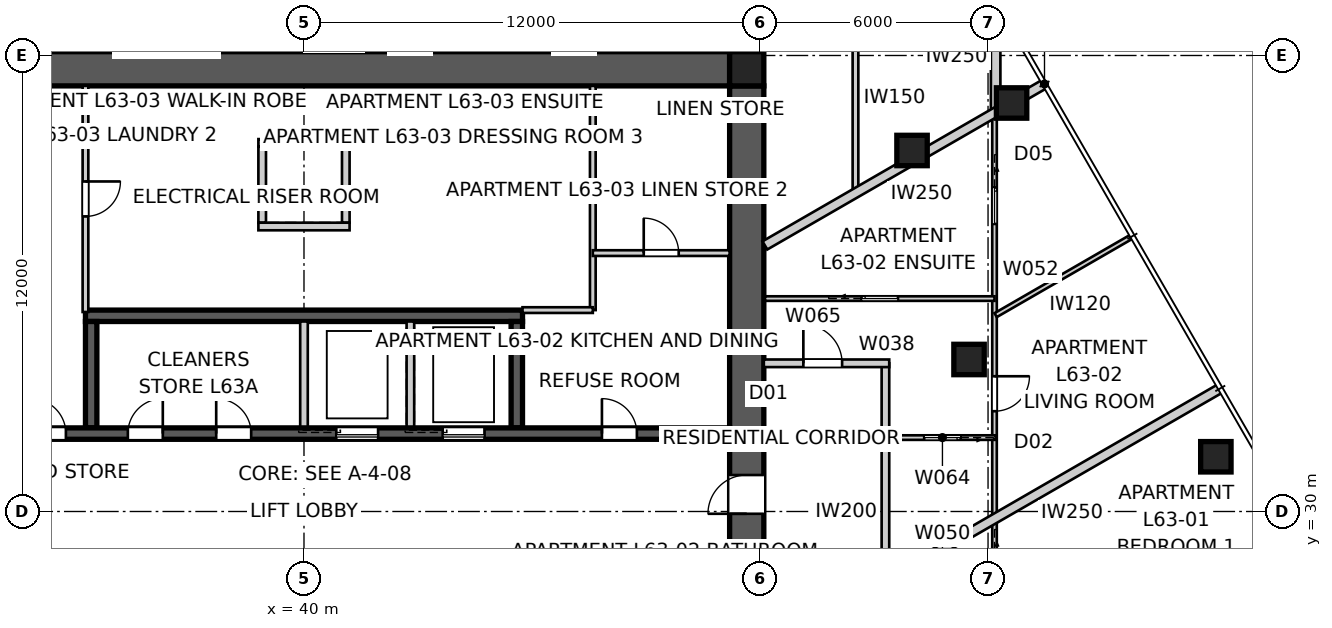
"""IFC4 building model, lengths in metres.
Left out: names, types, materials, properties, quantities, classifications, styles, units other than length and angle.
Written with IfcOpenShell. Run it as: python <this file> out.ifc"""

import sys

from ifc_helpers import new_model, si_unit, direction, frame, frame_2d, origin, origin_2d, place, context, subcontext, project, spatial, polyline, rectangle, outline, extrude, element, fill, save


model = new_model("IFC4")
c1 = context("Model", 3, precision=1e-05, world=origin(), true_north=direction((0.0, 1.0)))
c2 = subcontext(c1, "Body", "Model", "MODEL_VIEW")
j1 = project(units=[si_unit("LENGTHUNIT", "METRE"), si_unit("PLANEANGLEUNIT", "RADIAN")], contexts=[c1])
p1 = place(None, origin())
s1 = spatial("IfcSite", under=j1, at=p1, CompositionType="ELEMENT")
p2 = place(p1, origin())
s2 = spatial("IfcBuilding", under=s1, at=p2, CompositionType="ELEMENT")
p3 = place(p2, frame((0.0, 0.0, 228.6)))
s3 = spatial("IfcBuildingStorey", under=s2, at=p3, CompositionType="ELEMENT", Elevation=228.6)
p4 = place(p3, frame((28.8, 41.65, 0.0), z_axis=(0.0, 0.0, 1.0), x_axis=(1.0, 0.0, 0.0)))
e1 = element("IfcWall", 1, at=p4, inside=s3, PredefinedType="SHEAR", context=c2, shape_type="SweptSolid", body=[
    extrude(outline(polyline([(0.0, -0.45), (22.4, -0.45), (22.4, -0.025), (22.85, -0.025), (22.85, 0.025), (22.4, 0.025), (22.4, 0.45), (0.0, 0.45), (0.0, 0.025), (-0.45, 0.025), (-0.45, -0.025), (0.0, -0.025), (0.0, -0.45)])), origin(), (0.0, 0.0, 1.0), 3.4),
])
p5 = place(p3, frame((51.65, 18.8, 0.0), z_axis=(0.0, 0.0, 1.0), x_axis=(0.0, 1.0, 0.0)))
e2 = element("IfcWall", 2, at=p5, inside=s3, PredefinedType="SHEAR", context=c2, shape_type="SweptSolid", body=[
    extrude(outline(polyline([(0.0, -0.45), (22.4, -0.45), (22.4, -0.025), (22.85, -0.025), (22.85, 0.025), (22.4, 0.025), (22.4, 0.45), (0.0, 0.45), (0.0, 0.025), (-0.45, 0.025), (-0.45, -0.025), (0.0, -0.025), (0.0, -0.45)])), origin(), (0.0, 0.0, 1.0), 3.4),
])
p6 = place(p5, frame((11.14, 0.0, 0.0)))
e3 = element("IfcOpeningElement", 3, at=p6, cuts=e2, PredefinedType="OPENING", context=c2, shape_type="SweptSolid", body=[
    extrude(rectangle(XDim=1.02, YDim=2.4, at=frame_2d((0.51, 1.2))), frame((0.0, 0.46, 0.0), z_axis=(0.0, -1.0, 0.0), x_axis=(1.0, 0.0, 0.0)), (0.0, 0.0, 1.0), 0.92),
])
p7 = place(p3, frame((28.8, 32.05, 0.0), z_axis=(0.0, 0.0, 1.0), x_axis=(1.0, 0.0, 0.0)))
e4 = element("IfcWall", 4, at=p7, inside=s3, PredefinedType="SHEAR", context=c2, shape_type="SweptSolid", body=[
    extrude(rectangle(XDim=22.4, YDim=0.3, at=frame_2d((11.2, 0.0))), origin(), (0.0, 0.0, 1.0), 3.4),
])
p8 = place(p7, frame((19.04, 0.0, 0.0)))
e5 = element("IfcOpeningElement", 5, at=p8, cuts=e4, PredefinedType="OPENING", context=c2, shape_type="SweptSolid", body=[
    extrude(rectangle(XDim=0.92, YDim=2.1, at=frame_2d((0.46, 1.05))), frame((0.0, 0.16, 0.0), z_axis=(0.0, -1.0, 0.0), x_axis=(1.0, 0.0, 0.0)), (0.0, 0.0, 1.0), 0.32),
])
p9 = place(p7, frame((1.265, 0.0, 0.0)))
e6 = element("IfcOpeningElement", 6, at=p9, cuts=e4, PredefinedType="OPENING", context=c2, shape_type="SweptSolid", body=[
    extrude(rectangle(XDim=1.02, YDim=2.1, at=frame_2d((0.51, 1.05))), frame((0.0, 0.16, 0.0), z_axis=(0.0, -1.0, 0.0), x_axis=(1.0, 0.0, 0.0)), (0.0, 0.0, 1.0), 0.32),
])
p10 = place(p7, frame((4.015, 0.0, 0.0)))
e7 = element("IfcOpeningElement", 7, at=p10, cuts=e4, PredefinedType="OPENING", context=c2, shape_type="SweptSolid", body=[
    extrude(rectangle(XDim=0.92, YDim=2.1, at=frame_2d((0.46, 1.05))), frame((0.0, 0.16, 0.0), z_axis=(0.0, -1.0, 0.0), x_axis=(1.0, 0.0, 0.0)), (0.0, 0.0, 1.0), 0.32),
])
p11 = place(p7, frame((6.565, 0.0, 0.0)))
e8 = element("IfcOpeningElement", 8, at=p11, cuts=e4, PredefinedType="OPENING", context=c2, shape_type="SweptSolid", body=[
    extrude(rectangle(XDim=0.92, YDim=2.1, at=frame_2d((0.46, 1.05))), frame((0.0, 0.16, 0.0), z_axis=(0.0, -1.0, 0.0), x_axis=(1.0, 0.0, 0.0)), (0.0, 0.0, 1.0), 0.32),
])
p12 = place(p7, frame((8.89, 0.0, 0.0)))
e9 = element("IfcOpeningElement", 9, at=p12, cuts=e4, PredefinedType="OPENING", context=c2, shape_type="SweptSolid", body=[
    extrude(rectangle(XDim=0.92, YDim=2.1, at=frame_2d((0.46, 1.05))), frame((0.0, 0.16, 0.0), z_axis=(0.0, -1.0, 0.0), x_axis=(1.0, 0.0, 0.0)), (0.0, 0.0, 1.0), 0.32),
])
p13 = place(p7, frame((12.05, 0.0, 0.0)))
e10 = element("IfcOpeningElement", 10, at=p13, cuts=e4, PredefinedType="OPENING", context=c2, shape_type="SweptSolid", body=[
    extrude(rectangle(XDim=1.1, YDim=2.1, at=frame_2d((0.55, 1.05))), frame((0.0, 0.16, 0.0), z_axis=(0.0, -1.0, 0.0), x_axis=(1.0, 0.0, 0.0)), (0.0, 0.0, 1.0), 0.32),
])
p14 = place(p7, frame((14.85, 0.0, 0.0)))
e11 = element("IfcOpeningElement", 11, at=p14, cuts=e4, PredefinedType="OPENING", context=c2, shape_type="SweptSolid", body=[
    extrude(rectangle(XDim=1.1, YDim=2.1, at=frame_2d((0.55, 1.05))), frame((0.0, 0.16, 0.0), z_axis=(0.0, -1.0, 0.0), x_axis=(1.0, 0.0, 0.0)), (0.0, 0.0, 1.0), 0.32),
])
p15 = place(p3, frame((34.25, 35.15, 0.0), z_axis=(0.0, 0.0, 1.0), x_axis=(1.0, 0.0, 0.0)))
e12 = element("IfcWall", 12, at=p15, inside=s3, PredefinedType="SHEAR", context=c2, shape_type="SweptSolid", body=[
    extrude(rectangle(XDim=11.5, YDim=0.3, at=frame_2d((5.75, 0.0))), origin(), (0.0, 0.0, 1.0), 3.4),
])
p16 = place(p3, frame((34.4, 32.2, 0.0), z_axis=(0.0, 0.0, 1.0), x_axis=(0.0, 1.0, 0.0)))
e13 = element("IfcWall", 13, at=p16, inside=s3, PredefinedType="SHEAR", context=c2, shape_type="SweptSolid", body=[
    extrude(rectangle(XDim=2.8, YDim=0.3, at=frame_2d((1.4, 0.0))), origin(), (0.0, 0.0, 1.0), 3.4),
])
for number, where, z_axis, x_axis in (
    (14, (40.0, 32.2, 0.0), (0.0, 0.0, 1.0), (0.0, 1.0, 0.0)),
    (15, (42.8, 32.2, 0.0), (0.0, 0.0, 1.0), (0.0, 1.0, 0.0)),
):
    element("IfcWall", number, at=place(p3, frame(where, z_axis=z_axis, x_axis=x_axis)), inside=s3, PredefinedType="SOLIDWALL", context=c2, shape_type="SweptSolid", body=[
        extrude(rectangle(XDim=2.8, YDim=0.2, at=frame_2d((1.4, 0.0))), origin(), (0.0, 0.0, 1.0), 3.4),
    ])
p17 = place(p3, frame((45.6, 32.2, 0.0), z_axis=(0.0, 0.0, 1.0), x_axis=(0.0, 1.0, 0.0)))
e16 = element("IfcWall", 16, at=p17, inside=s3, PredefinedType="SHEAR", context=c2, shape_type="SweptSolid", body=[
    extrude(rectangle(XDim=2.8, YDim=0.3, at=frame_2d((1.4, 0.0))), origin(), (0.0, 0.0, 1.0), 3.4),
])
for number, where, z_axis, x_axis in (
    (17, (38.9, 37.6, 0.0), (0.0, 0.0, 1.0), (0.0, 1.0, 0.0)),
    (18, (41.1, 37.6, 0.0), (0.0, 0.0, 1.0), (0.0, 1.0, 0.0)),
):
    element("IfcWall", number, at=place(p3, frame(where, z_axis=z_axis, x_axis=x_axis)), inside=s3, PredefinedType="SOLIDWALL", context=c2, shape_type="SweptSolid", body=[
        extrude(rectangle(XDim=2.0, YDim=0.2, at=frame_2d((1.0, 0.0))), origin(), (0.0, 0.0, 1.0), 3.4),
    ])
for number, where, z_axis, x_axis in (
    (19, (38.8, 37.5, 0.0), (0.0, 0.0, 1.0), (1.0, 0.0, 0.0)),
    (20, (38.8, 39.7, 0.0), (0.0, 0.0, 1.0), (1.0, 0.0, 0.0)),
):
    element("IfcWall", number, at=place(p3, frame(where, z_axis=z_axis, x_axis=x_axis)), inside=s3, PredefinedType="SOLIDWALL", context=c2, shape_type="SweptSolid", body=[
        extrude(rectangle(XDim=2.4, YDim=0.2, at=frame_2d((1.2, 0.0))), origin(), (0.0, 0.0, 1.0), 3.4),
    ])
p18 = place(p3, frame((51.65, 41.65, 0.0), z_axis=(0.0, 0.0, 1.0), x_axis=(1.0, 0.0, 0.0)))
e21 = element("IfcColumn", 21, at=p18, inside=s3, PredefinedType="COLUMN", context=c2, shape_type="SweptSolid", body=[
    extrude(rectangle(XDim=0.9, YDim=0.9, at=origin_2d()), origin(), (0.0, 0.0, 1.0), 3.4),
])
for number, where, z_axis, x_axis in (
    (22, (63.995, 31.44, 0.0), (0.0, 0.0, 1.0), (1.0, 0.0, 0.0)),
    (23, (58.62, 40.75, 0.0), (0.0, 0.0, 1.0), (1.0, 0.0, 0.0)),
    (24, (57.5, 34.0, 0.0), (0.0, 0.0, 1.0), (1.0, 0.0, 0.0)),
    (25, (56.0, 39.5, 0.0), (0.0, 0.0, 1.0), (1.0, 0.0, 0.0)),
):
    element("IfcColumn", number, at=place(p3, frame(where, z_axis=z_axis, x_axis=x_axis)), inside=s3, PredefinedType="COLUMN", context=c2, shape_type="SweptSolid", body=[
        extrude(rectangle(XDim=0.8, YDim=0.8, at=origin_2d()), origin(), (0.0, 0.0, 1.0), 3.4),
    ])
p19 = place(p3, frame((55.3, 26.1, 0.0), z_axis=(0.0, 0.0, 1.0), x_axis=(0.0, 1.0, 0.0)))
e26 = element("IfcWall", 26, at=p19, inside=s3, PredefinedType="PARTITIONING", context=c2, shape_type="SweptSolid", body=[
    extrude(rectangle(XDim=7.8, YDim=0.2, at=frame_2d((3.9, 0.0))), origin(), (0.0, 0.0, 1.0), 3.25),
])
p20 = place(p3, frame((52.1, 33.9, 0.0), z_axis=(0.0, 0.0, 1.0), x_axis=(1.0, 0.0, 0.0)))
e27 = element("IfcWall", 27, at=p20, inside=s3, PredefinedType="PARTITIONING", context=c2, shape_type="SweptSolid", body=[
    extrude(rectangle(XDim=3.3, YDim=0.2, at=frame_2d((1.65, 0.0))), origin(), (0.0, 0.0, 1.0), 3.25),
])
p21 = place(p20, frame((1.04, 0.0, 0.0)))
e28 = element("IfcOpeningElement", 28, at=p21, cuts=e27, PredefinedType="OPENING", context=c2, shape_type="SweptSolid", body=[
    extrude(rectangle(XDim=1.02, YDim=2.34, at=frame_2d((0.51, 1.17))), frame((0.0, 0.11, 0.0), z_axis=(0.0, -1.0, 0.0), x_axis=(1.0, 0.0, 0.0)), (0.0, 0.0, 1.0), 0.22),
])
p22 = place(p3, frame((64.111, 33.239, 0.0), z_axis=(0.0, 0.0, 1.0), x_axis=(-0.866024190901, -0.50000210077, 0.0)))
e29 = element("IfcWall", 29, at=p22, inside=s3, PredefinedType="PARTITIONING", context=c2, shape_type="SweptSolid", body=[
    extrude(rectangle(XDim=10.026, YDim=0.25, at=frame_2d((5.013, 0.0))), origin(), (0.0, 0.0, 1.0), 3.25),
])
p23 = place(p3, frame((59.486, 41.25, 0.0), z_axis=(0.0, 0.0, 1.0), x_axis=(-0.866020489494, -0.500008511703, 0.0)))
e30 = element("IfcWall", 30, at=p23, inside=s3, PredefinedType="PARTITIONING", context=c2, shape_type="SweptSolid", body=[
    extrude(rectangle(XDim=8.496, YDim=0.25, at=frame_2d((4.248, 0.0))), origin(), (0.0, 0.0, 1.0), 3.25),
])
p24 = place(p3, frame((34.25, 41.2, 0.0), z_axis=(0.0, 0.0, 1.0), x_axis=(0.0, -1.0, 0.0)))
e31 = element("IfcWall", 31, at=p24, inside=s3, PredefinedType="SOLIDWALL", context=c2, shape_type="SweptSolid", body=[
    extrude(rectangle(XDim=5.95, YDim=0.15, at=frame_2d((2.975, 0.0))), origin(), (0.0, 0.0, 1.0), 3.25),
])
p25 = place(p24, frame((2.515, 0.0, 0.0)))
e32 = element("IfcOpeningElement", 32, at=p25, cuts=e31, PredefinedType="OPENING", context=c2, shape_type="SweptSolid", body=[
    extrude(rectangle(XDim=0.92, YDim=2.1, at=frame_2d((0.46, 1.05))), frame((0.0, 0.085, 0.0), z_axis=(0.0, -1.0, 0.0), x_axis=(1.0, 0.0, 0.0)), (0.0, 0.0, 1.0), 0.17),
])
p26 = place(p3, frame((47.6, 41.2, 0.0), z_axis=(0.0, 0.0, 1.0), x_axis=(0.0, -1.0, 0.0)))
e33 = element("IfcWall", 33, at=p26, inside=s3, PredefinedType="SOLIDWALL", context=c2, shape_type="SweptSolid", body=[
    extrude(rectangle(XDim=5.9, YDim=0.15, at=frame_2d((2.95, 0.0))), origin(), (0.0, 0.0, 1.0), 3.25),
])
p27 = place(p3, frame((47.6, 35.3, 0.0), z_axis=(0.0, 0.0, 1.0), x_axis=(-1.0, 0.0, 0.0)))
e34 = element("IfcWall", 34, at=p27, inside=s3, PredefinedType="SOLIDWALL", context=c2, shape_type="SweptSolid", body=[
    extrude(rectangle(XDim=1.85, YDim=0.15, at=frame_2d((0.925, 0.0))), origin(), (0.0, 0.0, 1.0), 3.25),
])
p28 = place(p3, frame((47.6, 36.8, 0.0), z_axis=(0.0, 0.0, 1.0), x_axis=(1.0, 0.0, 0.0)))
e35 = element("IfcWall", 35, at=p28, inside=s3, PredefinedType="SOLIDWALL", context=c2, shape_type="SweptSolid", body=[
    extrude(rectangle(XDim=3.6, YDim=0.15, at=frame_2d((1.8, 0.0))), origin(), (0.0, 0.0, 1.0), 3.25),
])
p29 = place(p28, frame((1.34, 0.0, 0.0)))
e36 = element("IfcOpeningElement", 36, at=p29, cuts=e35, PredefinedType="OPENING", context=c2, shape_type="SweptSolid", body=[
    extrude(rectangle(XDim=0.92, YDim=2.1, at=frame_2d((0.46, 1.05))), frame((0.0, 0.085, 0.0), z_axis=(0.0, -1.0, 0.0), x_axis=(1.0, 0.0, 0.0)), (0.0, 0.0, 1.0), 0.17),
])
p30 = place(p3, frame((58.171, 40.491, 0.0), z_axis=(0.0, 0.0, 1.0), x_axis=(-5.1455328e-05, -0.999999998676, 0.0)))
e37 = element("IfcWall", 37, at=p30, inside=s3, PredefinedType="PARTITIONING", context=c2, shape_type="SweptSolid", body=[
    extrude(rectangle(XDim=14.234, YDim=0.12, at=frame_2d((7.117, 0.0))), origin(), (0.0, 0.0, 1.0), 3.25),
])
p31 = place(p30, frame((6.932, 0.0, 0.0)))
e38 = element("IfcOpeningElement", 38, at=p31, cuts=e37, PredefinedType="OPENING", context=c2, shape_type="SweptSolid", body=[
    extrude(rectangle(XDim=0.92, YDim=2.34, at=frame_2d((0.46, 1.17))), frame((0.0, 0.07, 0.0), z_axis=(0.0, -1.0, 0.0), x_axis=(1.0, 0.0, 0.0)), (0.0, 0.0, 1.0), 0.14),
])
p32 = place(p30, frame((11.829, 0.0, 0.0)))
e39 = element("IfcOpeningElement", 39, at=p32, cuts=e37, PredefinedType="OPENING", context=c2, shape_type="SweptSolid", body=[
    extrude(rectangle(XDim=0.96, YDim=2.1, at=frame_2d((0.48, 1.05))), frame((0.0, 0.07, 0.0), z_axis=(0.0, -1.0, 0.0), x_axis=(1.0, 0.0, 0.0)), (0.0, 0.0, 1.0), 0.14),
])
p33 = place(p30, frame((1.964, 0.0, 0.0)))
e40 = element("IfcOpeningElement", 40, at=p33, cuts=e37, PredefinedType="OPENING", context=c2, shape_type="SweptSolid", body=[
    extrude(rectangle(XDim=0.96, YDim=2.1, at=frame_2d((0.48, 1.05))), frame((0.0, 0.07, 0.0), z_axis=(0.0, -1.0, 0.0), x_axis=(1.0, 0.0, 0.0)), (0.0, 0.0, 1.0), 0.14),
])
p34 = place(p3, frame((66.388, 29.214, 0.0), z_axis=(0.0, 0.0, 1.0), x_axis=(-0.86602907136, -0.49999364752, 0.0)))
e41 = element("IfcWall", 41, at=p34, inside=s3, PredefinedType="PARTITIONING", context=c2, shape_type="SweptSolid", body=[
    extrude(rectangle(XDim=9.455, YDim=0.12, at=frame_2d((4.728, 0.0))), origin(), (0.0, 0.0, 1.0), 3.25),
])
p35 = place(p3, frame((58.2, 31.945, 0.0), z_axis=(0.0, 0.0, 1.0), x_axis=(-1.0, 0.0, 0.0)))
e42 = element("IfcWall", 42, at=p35, inside=s3, PredefinedType="PARTITIONING", context=c2, shape_type="SweptSolid", body=[
    extrude(rectangle(XDim=2.8, YDim=0.12, at=frame_2d((1.4, 0.0))), origin(), (0.0, 0.0, 1.0), 3.25),
])
p36 = place(p35, frame((0.92, 0.0, 0.0)))
e43 = element("IfcOpeningElement", 43, at=p36, cuts=e42, PredefinedType="OPENING", context=c2, shape_type="SweptSolid", body=[
    extrude(rectangle(XDim=0.96, YDim=2.1, at=frame_2d((0.48, 1.05))), frame((0.0, 0.07, 0.0), z_axis=(0.0, -1.0, 0.0), x_axis=(1.0, 0.0, 0.0)), (0.0, 0.0, 1.0), 0.14),
])
p37 = place(p3, frame((52.13, 35.603, 0.0), z_axis=(0.0, 0.0, 1.0), x_axis=(1.0, 0.0, 0.0)))
e44 = element("IfcWall", 44, at=p37, inside=s3, PredefinedType="PARTITIONING", context=c2, shape_type="SweptSolid", body=[
    extrude(rectangle(XDim=6.04, YDim=0.12, at=frame_2d((3.02, 0.0))), origin(), (0.0, 0.0, 1.0), 3.25),
])
p38 = place(p37, frame((2.54, 0.0, 0.0)))
e45 = element("IfcOpeningElement", 45, at=p38, cuts=e44, PredefinedType="OPENING", context=c2, shape_type="SweptSolid", body=[
    extrude(rectangle(XDim=0.96, YDim=2.1, at=frame_2d((0.48, 1.05))), frame((0.0, 0.07, 0.0), z_axis=(0.0, -1.0, 0.0), x_axis=(1.0, 0.0, 0.0)), (0.0, 0.0, 1.0), 0.14),
])
p39 = place(p3, frame((58.2, 35.167, 0.0), z_axis=(0.0, 0.0, 1.0), x_axis=(0.866025520146, 0.499999798456, 0.0)))
e46 = element("IfcWall", 46, at=p39, inside=s3, PredefinedType="PARTITIONING", context=c2, shape_type="SweptSolid", body=[
    extrude(rectangle(XDim=4.115, YDim=0.12, at=frame_2d((2.057, 0.0))), origin(), (0.0, 0.0, 1.0), 3.25),
])
p40 = place(p3, frame((58.2, 40.525, 0.0), z_axis=(0.0, 0.0, 1.0), x_axis=(0.0, 1.0, 0.0)))
e47 = element("IfcWall", 47, at=p40, inside=s3, PredefinedType="PARTITIONING", context=c2, shape_type="SweptSolid", body=[
    extrude(rectangle(XDim=2.872, YDim=0.25, at=frame_2d((1.436, 0.0))), origin(), (0.0, 0.0, 1.0), 3.25),
])
p41 = place(p3, frame((54.512, 43.376, 0.0), z_axis=(0.0, 0.0, 1.0), x_axis=(0.0, -1.0, 0.0)))
e48 = element("IfcWall", 48, at=p41, inside=s3, PredefinedType="SOLIDWALL", context=c2, shape_type="SweptSolid", body=[
    extrude(rectangle(XDim=4.998, YDim=0.15, at=frame_2d((2.499, 0.0))), origin(), (0.0, 0.0, 1.0), 3.25),
])
p42 = place(p8, origin())
e49 = element("IfcDoor", 49, at=p42, inside=s3, OperationType="SINGLE_SWING_LEFT", PredefinedType="DOOR", context=c2, shape_type="SweptSolid", body=[
    extrude(rectangle(XDim=0.92, YDim=2.1, at=frame_2d((0.46, 1.05))), frame((0.0, 0.025, 0.0), z_axis=(0.0, -1.0, 0.0), x_axis=(1.0, 0.0, 0.0)), (0.0, 0.0, 1.0), 0.05),
])
fill(e5, e49)
p43 = place(p10, origin())
e50 = element("IfcDoor", 50, at=p43, inside=s3, OperationType="SINGLE_SWING_LEFT", PredefinedType="DOOR", context=c2, shape_type="SweptSolid", body=[
    extrude(rectangle(XDim=0.92, YDim=2.1, at=frame_2d((0.46, 1.05))), frame((0.0, 0.025, 0.0), z_axis=(0.0, -1.0, 0.0), x_axis=(1.0, 0.0, 0.0)), (0.0, 0.0, 1.0), 0.05),
])
fill(e7, e50)
p44 = place(p21, origin())
e51 = element("IfcDoor", 51, at=p44, inside=s3, OperationType="SINGLE_SWING_LEFT", PredefinedType="DOOR", context=c2, shape_type="SweptSolid", body=[
    extrude(rectangle(XDim=1.02, YDim=2.34, at=frame_2d((0.51, 1.17))), frame((0.0, 0.025, 0.0), z_axis=(0.0, -1.0, 0.0), x_axis=(1.0, 0.0, 0.0)), (0.0, 0.0, 1.0), 0.05),
])
fill(e28, e51)
p45 = place(p29, origin())
e52 = element("IfcDoor", 52, at=p45, inside=s3, OperationType="SINGLE_SWING_LEFT", PredefinedType="DOOR", context=c2, shape_type="SweptSolid", body=[
    extrude(rectangle(XDim=0.92, YDim=2.1, at=frame_2d((0.46, 1.05))), frame((0.0, 0.025, 0.0), z_axis=(0.0, -1.0, 0.0), x_axis=(1.0, 0.0, 0.0)), (0.0, 0.0, 1.0), 0.05),
])
fill(e36, e52)
p46 = place(p25, origin())
e53 = element("IfcDoor", 53, at=p46, inside=s3, OperationType="SINGLE_SWING_LEFT", PredefinedType="DOOR", context=c2, shape_type="SweptSolid", body=[
    extrude(rectangle(XDim=0.92, YDim=2.1, at=frame_2d((0.46, 1.05))), frame((0.0, 0.025, 0.0), z_axis=(0.0, -1.0, 0.0), x_axis=(1.0, 0.0, 0.0)), (0.0, 0.0, 1.0), 0.05),
])
fill(e32, e53)
p47 = place(p38, origin())
e54 = element("IfcDoor", 54, at=p47, inside=s3, OperationType="SLIDING_TO_LEFT", PredefinedType="DOOR", context=c2, shape_type="SweptSolid", body=[
    extrude(rectangle(XDim=0.96, YDim=2.1, at=frame_2d((0.48, 1.05))), frame((0.0, 0.025, 0.0), z_axis=(0.0, -1.0, 0.0), x_axis=(1.0, 0.0, 0.0)), (0.0, 0.0, 1.0), 0.05),
])
fill(e45, e54)
p48 = place(p31, origin())
e55 = element("IfcDoor", 55, at=p48, inside=s3, OperationType="SINGLE_SWING_LEFT", PredefinedType="DOOR", context=c2, shape_type="SweptSolid", body=[
    extrude(rectangle(XDim=0.92, YDim=2.34, at=frame_2d((0.46, 1.17))), frame((0.0, 0.025, 0.0), z_axis=(0.0, -1.0, 0.0), x_axis=(1.0, 0.0, 0.0)), (0.0, 0.0, 1.0), 0.05),
])
fill(e38, e55)
p49 = place(p36, origin())
e56 = element("IfcDoor", 56, at=p49, inside=s3, OperationType="SLIDING_TO_LEFT", PredefinedType="DOOR", context=c2, shape_type="SweptSolid", body=[
    extrude(rectangle(XDim=0.96, YDim=2.1, at=frame_2d((0.48, 1.05))), frame((0.0, 0.025, 0.0), z_axis=(0.0, -1.0, 0.0), x_axis=(1.0, 0.0, 0.0)), (0.0, 0.0, 1.0), 0.05),
])
fill(e43, e56)
p50 = place(p33, origin())
e57 = element("IfcDoor", 57, at=p50, inside=s3, OperationType="SLIDING_TO_LEFT", PredefinedType="DOOR", context=c2, shape_type="SweptSolid", body=[
    extrude(rectangle(XDim=0.96, YDim=2.1, at=frame_2d((0.48, 1.05))), frame((0.0, 0.025, 0.0), z_axis=(0.0, -1.0, 0.0), x_axis=(1.0, 0.0, 0.0)), (0.0, 0.0, 1.0), 0.05),
])
fill(e40, e57)
p51 = place(p11, origin())
e58 = element("IfcDoor", 58, at=p51, inside=s3, OperationType="SINGLE_SWING_RIGHT", PredefinedType="DOOR", context=c2, shape_type="SweptSolid", body=[
    extrude(rectangle(XDim=0.92, YDim=2.1, at=frame_2d((0.46, 1.05))), frame((0.0, 0.025, 0.0), z_axis=(0.0, -1.0, 0.0), x_axis=(1.0, 0.0, 0.0)), (0.0, 0.0, 1.0), 0.05),
])
fill(e8, e58)
p52 = place(p12, origin())
e59 = element("IfcDoor", 59, at=p52, inside=s3, OperationType="SINGLE_SWING_LEFT", PredefinedType="DOOR", context=c2, shape_type="SweptSolid", body=[
    extrude(rectangle(XDim=0.92, YDim=2.1, at=frame_2d((0.46, 1.05))), frame((0.0, 0.025, 0.0), z_axis=(0.0, -1.0, 0.0), x_axis=(1.0, 0.0, 0.0)), (0.0, 0.0, 1.0), 0.05),
])
fill(e9, e59)
p53 = place(p6, origin())
e60 = element("IfcDoor", 60, at=p53, inside=s3, OperationType="SINGLE_SWING_LEFT", PredefinedType="DOOR", context=c2, shape_type="SweptSolid", body=[
    extrude(rectangle(XDim=1.02, YDim=2.4, at=frame_2d((0.51, 1.2))), frame((0.0, 0.025, 0.0), z_axis=(0.0, -1.0, 0.0), x_axis=(1.0, 0.0, 0.0)), (0.0, 0.0, 1.0), 0.05),
])
fill(e3, e60)
p54 = place(p13, origin())
e61 = element("IfcDoor", 61, at=p54, inside=s3, OperationType="SLIDING_TO_LEFT", PredefinedType="DOOR", context=c2, shape_type="SweptSolid", body=[
    extrude(rectangle(XDim=1.1, YDim=2.1, at=frame_2d((0.55, 1.05))), frame((0.0, 0.025, 0.0), z_axis=(0.0, -1.0, 0.0), x_axis=(1.0, 0.0, 0.0)), (0.0, 0.0, 1.0), 0.05),
])
fill(e10, e61)
p55 = place(p14, origin())
e62 = element("IfcDoor", 62, at=p55, inside=s3, OperationType="SLIDING_TO_LEFT", PredefinedType="DOOR", context=c2, shape_type="SweptSolid", body=[
    extrude(rectangle(XDim=1.1, YDim=2.1, at=frame_2d((0.55, 1.05))), frame((0.0, 0.025, 0.0), z_axis=(0.0, -1.0, 0.0), x_axis=(1.0, 0.0, 0.0)), (0.0, 0.0, 1.0), 0.05),
])
fill(e11, e62)
save(model, sys.argv[1])
